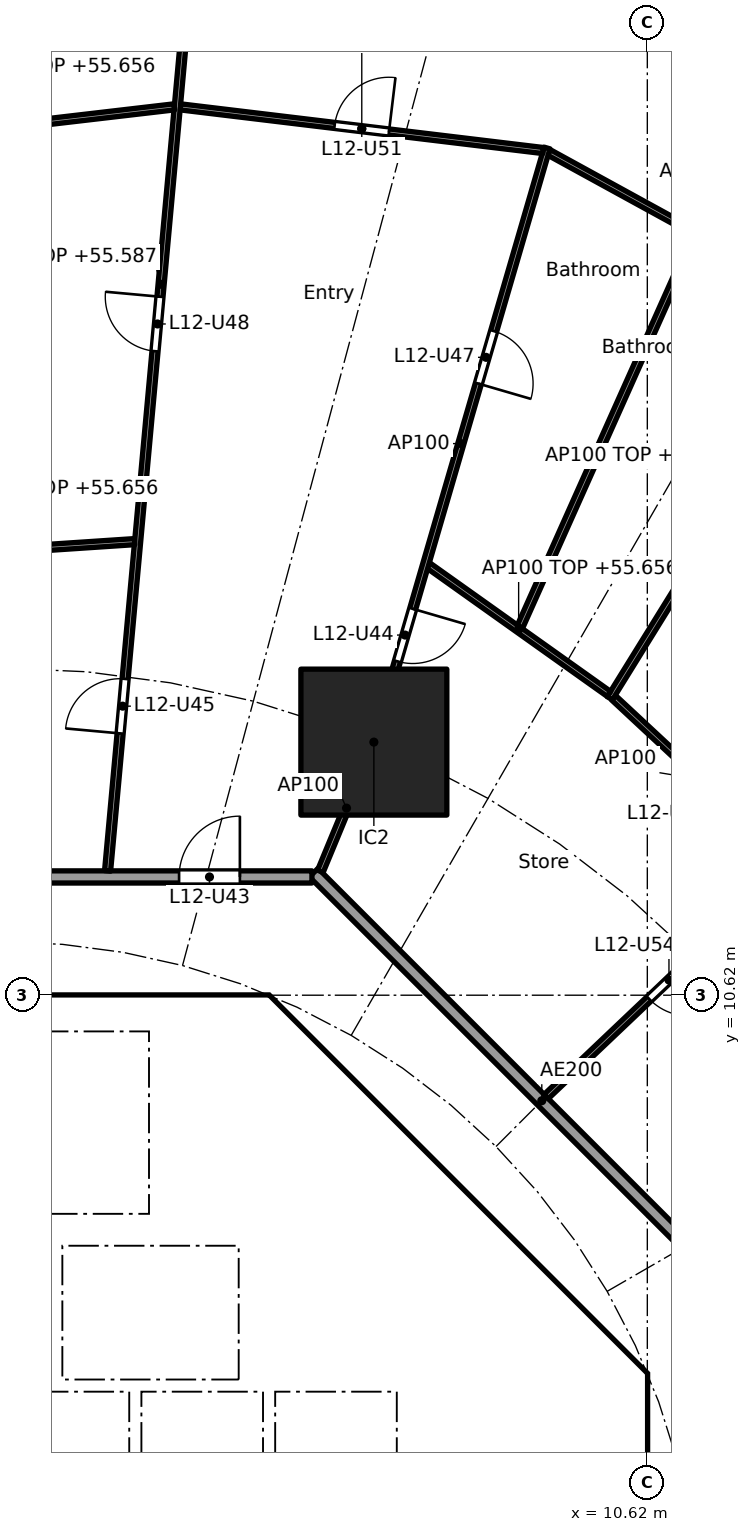
"""IFC4 building model, lengths in metres.
Left out: names, types, materials, properties, quantities, classifications, styles, units other than length and angle.
Written with IfcOpenShell. Run it as: python <this file> out.ifc"""

import sys

from ifc_helpers import new_model, si_unit, direction, frame, frame_2d, origin, origin_2d, place, context, subcontext, project, spatial, polyline, rectangle, outline, extrude, element, fill, save


model = new_model("IFC4")
c1 = context("Model", 3, precision=1e-05, world=origin(), true_north=direction((0.0, 1.0)))
c2 = subcontext(c1, "Body", "Model", "MODEL_VIEW")
j1 = project(units=[si_unit("LENGTHUNIT", "METRE"), si_unit("PLANEANGLEUNIT", "RADIAN")], contexts=[c1])
p1 = place(None, origin())
s1 = spatial("IfcSite", under=j1, at=p1, CompositionType="ELEMENT")
p2 = place(p1, origin())
s2 = spatial("IfcBuilding", under=s1, at=p2, CompositionType="ELEMENT")
p3 = place(p2, frame((0.0, 0.0, 52.9)))
s3 = spatial("IfcBuildingStorey", under=s2, at=p3, CompositionType="ELEMENT", Elevation=52.9)
p4 = place(p3, frame((6.123, 14.782, 0.0), z_axis=(0.0, 0.0, 1.0), x_axis=(1.0, 0.0, 0.0)))
e1 = element("IfcColumn", 1, at=p4, inside=s3, PredefinedType="COLUMN", context=c2, shape_type="SweptSolid", body=[
    extrude(rectangle(XDim=2.4, YDim=2.4, at=origin_2d()), origin(), (0.0, 0.0, 1.0), 3.7),
])
p5 = place(p3, frame((9.988, 4.613, 0.0), z_axis=(0.0, 0.0, 1.0), x_axis=(-0.707106781187, 0.707106781187, 0.0)))
e2 = element("IfcWall", 2, at=p5, inside=s3, PredefinedType="SHEAR", context=c2, shape_type="SweptSolid", body=[
    extrude(rectangle(XDim=7.602, YDim=0.6, at=frame_2d((3.801, 0.0))), origin(), (0.0, 0.0, 1.0), 3.44),
])
p6 = place(p5, frame((3.201, 0.0, 0.0)))
e3 = element("IfcOpeningElement", 3, at=p6, cuts=e2, PredefinedType="OPENING", context=c2, shape_type="SweptSolid", body=[
    extrude(rectangle(XDim=1.2, YDim=2.1, at=frame_2d((0.6, 1.05))), frame((0.0, 0.31, 0.0), z_axis=(0.0, -1.0, 0.0), x_axis=(1.0, 0.0, 0.0)), (0.0, 0.0, 1.0), 0.62),
])
p7 = place(p3, frame((4.0, 4.3, 0.0), z_axis=(0.0, 0.0, 1.0), x_axis=(0.0, 1.0, 0.0)))
e4 = element("IfcWall", 4, at=p7, inside=s3, PredefinedType="SOLIDWALL", context=c2, shape_type="SweptSolid", body=[
    extrude(rectangle(XDim=2.2, YDim=0.2, at=frame_2d((1.1, 0.0))), origin(), (0.0, 0.0, 1.0), 3.44),
])
p8 = place(p7, frame((0.55, 0.0, 0.0)))
e5 = element("IfcOpeningElement", 5, at=p8, cuts=e4, PredefinedType="OPENING", context=c2, shape_type="SweptSolid", body=[
    extrude(rectangle(XDim=1.1, YDim=2.1, at=frame_2d((0.55, 1.05))), frame((0.0, 0.11, 0.0), z_axis=(0.0, -1.0, 0.0), x_axis=(1.0, 0.0, 0.0)), (0.0, 0.0, 1.0), 0.22),
])
p9 = place(p3, frame((6.7, 4.0, 0.0), z_axis=(0.0, 0.0, 1.0), x_axis=(1.0, 0.0, 0.0)))
e6 = element("IfcWall", 6, at=p9, inside=s3, PredefinedType="SOLIDWALL", context=c2, shape_type="SweptSolid", body=[
    extrude(rectangle(XDim=3.325, YDim=0.2, at=frame_2d((1.662, 0.0))), origin(), (0.0, 0.0, 1.0), 3.44),
])
p10 = place(p9, frame((1.25, 0.0, 0.0)))
e7 = element("IfcOpeningElement", 7, at=p10, cuts=e6, PredefinedType="OPENING", context=c2, shape_type="SweptSolid", body=[
    extrude(rectangle(XDim=1.1, YDim=2.1, at=frame_2d((0.55, 1.05))), frame((0.0, 0.11, 0.0), z_axis=(0.0, -1.0, 0.0), x_axis=(1.0, 0.0, 0.0)), (0.0, 0.0, 1.0), 0.22),
])
p11 = place(p3, frame((4.0, 7.025, 0.0), z_axis=(0.0, 0.0, 1.0), x_axis=(0.0, 1.0, 0.0)))
e8 = element("IfcWall", 8, at=p11, inside=s3, PredefinedType="SOLIDWALL", context=c2, shape_type="SweptSolid", body=[
    extrude(rectangle(XDim=3.0, YDim=0.2, at=frame_2d((1.5, 0.0))), origin(), (0.0, 0.0, 1.0), 3.44),
])
p12 = place(p11, frame((0.925, 0.0, 0.0)))
e9 = element("IfcOpeningElement", 9, at=p12, cuts=e8, PredefinedType="OPENING", context=c2, shape_type="SweptSolid", body=[
    extrude(rectangle(XDim=1.1, YDim=2.1, at=frame_2d((0.55, 1.05))), frame((0.0, 0.11, 0.0), z_axis=(0.0, -1.0, 0.0), x_axis=(1.0, 0.0, 0.0)), (0.0, 0.0, 1.0), 0.22),
])
p13 = place(p3, origin())
e10 = element("IfcWall", 10, at=p13, inside=s3, PredefinedType="SHEAR", context=c2, shape_type="SweptSolid", body=[
    extrude(outline(polyline([(-4.152, 10.025), (-4.401, 9.776), (-4.825, 10.2), (-4.401, 10.625), (4.401, 10.625), (4.825, 10.2), (4.401, 9.776), (4.152, 10.025), (-4.152, 10.025)])), origin(), (0.0, 0.0, 1.0), 3.44),
])
p14 = place(p3, origin())
e11 = element("IfcWall", 11, at=p14, inside=s3, PredefinedType="SHEAR", context=c2, shape_type="SweptSolid", body=[
    extrude(outline(polyline([(9.776, -4.401), (10.025, -4.152), (10.025, -3.801), (10.025, 4.152), (9.776, 4.401), (10.2, 4.825), (10.625, 4.401), (10.625, -4.401), (10.2, -4.825), (9.776, -4.401)])), origin(), (0.0, 0.0, 1.0), 3.44),
])
p15 = place(p3, frame((0.9, 4.3, 0.0), z_axis=(0.0, 0.0, 1.0), x_axis=(0.0, 1.0, 0.0)))
e12 = element("IfcWall", 12, at=p15, inside=s3, PredefinedType="SOLIDWALL", context=c2, shape_type="SweptSolid", body=[
    extrude(rectangle(XDim=2.2, YDim=0.2, at=frame_2d((1.1, 0.0))), origin(), (0.0, 0.0, 1.0), 3.44),
])
p16 = place(p3, origin())
e13 = element("IfcWall", 13, at=p16, inside=s3, PredefinedType="SOLIDWALL", context=c2, shape_type="SweptSolid", body=[
    extrude(outline(polyline([(-6.5, 2.1), (-6.7, 2.1), (-6.7, 4.3), (6.7, 4.3), (6.7, 2.1), (6.5, 2.1), (6.5, 4.1), (4.5, 4.1), (4.5, 2.1), (4.3, 2.1), (4.3, 4.1), (2.3, 4.1), (2.3, 2.1), (2.1, 2.1), (2.1, 4.1), (0.1, 4.1), (0.1, 2.1), (-0.1, 2.1), (-0.1, 4.1), (-2.1, 4.1), (-2.1, 2.1), (-2.3, 2.1), (-2.3, 4.1), (-4.3, 4.1), (-4.3, 2.1), (-4.5, 2.1), (-4.5, 4.1), (-6.5, 4.1), (-6.5, 2.1)])), origin(), (0.0, 0.0, 1.0), 3.44),
])
p17 = place(p3, origin())
e14 = element("IfcWall", 14, at=p17, inside=s3, PredefinedType="SOLIDWALL", context=c2, shape_type="SweptSolid", body=[
    extrude(outline(polyline([(4.1, 6.5), (-4.1, 6.5), (-4.1, 7.025), (4.1, 7.025), (4.1, 6.5)])), origin(), (0.0, 0.0, 1.0), 3.44),
])
p18 = place(p3, origin())
e15 = element("IfcWall", 15, at=p18, inside=s3, PredefinedType="SOLIDWALL", context=c2, shape_type="SweptSolid", body=[
    extrude(outline(polyline([(7.025, -3.9), (6.7, -3.9), (6.7, 3.9), (7.025, 3.9), (7.025, -3.9)])), origin(), (0.0, 0.0, 1.0), 3.44),
])
p19 = place(p3, frame((12.635, 5.134, 0.0), z_axis=(0.0, 0.0, 1.0), x_axis=(-0.707106781187, 0.707106781187, 0.0)))
e16 = element("IfcWall", 16, at=p19, inside=s3, PredefinedType="PARTITIONING", context=c2, shape_type="SweptSolid", body=[
    extrude(rectangle(XDim=10.609, YDim=0.2, at=frame_2d((5.305, 0.0))), origin(), (0.0, 0.0, 1.0), 3.44),
])
p20 = place(p3, frame((5.104, 12.565, 0.0), z_axis=(0.0, 0.0, 1.0), x_axis=(-1.0, 0.0, 0.0)))
e17 = element("IfcWall", 17, at=p20, inside=s3, PredefinedType="PARTITIONING", context=c2, shape_type="SweptSolid", body=[
    extrude(rectangle(XDim=10.409, YDim=0.2, at=frame_2d((5.205, 0.0))), origin(), (0.0, 0.0, 1.0), 3.44),
])
p21 = place(p20, frame((1.185, 0.0, 0.0)))
e18 = element("IfcOpeningElement", 18, at=p21, cuts=e17, PredefinedType="OPENING", context=c2, shape_type="SweptSolid", body=[
    extrude(rectangle(XDim=1.0, YDim=2.1, at=frame_2d((0.5, 1.05))), frame((0.0, 0.11, 0.0), z_axis=(0.0, -1.0, 0.0), x_axis=(1.0, 0.0, 0.0)), (0.0, 0.0, 1.0), 0.22),
])
p22 = place(p3, frame((8.957, 8.953, 0.0), z_axis=(0.0, 0.0, 1.0), x_axis=(0.725250022034, 0.688485588476, 0.0)))
e19 = element("IfcWall", 19, at=p22, inside=s3, PredefinedType="PARTITIONING", context=c2, shape_type="SweptSolid", body=[
    extrude(rectangle(XDim=12.963, YDim=0.1, at=frame_2d((6.481, 0.0))), origin(), (0.0, 0.0, 1.0), 2.687),
])
p23 = place(p22, frame((2.333, 0.0, 0.0)))
e20 = element("IfcOpeningElement", 20, at=p23, cuts=e19, PredefinedType="OPENING", context=c2, shape_type="SweptSolid", body=[
    extrude(rectangle(XDim=0.9, YDim=2.1, at=frame_2d((0.45, 1.05))), frame((0.0, 0.06, 0.0), z_axis=(0.0, -1.0, 0.0), x_axis=(1.0, 0.0, 0.0)), (0.0, 0.0, 1.0), 0.12),
])
p24 = place(p22, frame((8.79, 0.0, 0.0)))
e21 = element("IfcOpeningElement", 21, at=p24, cuts=e19, PredefinedType="OPENING", context=c2, shape_type="SweptSolid", body=[
    extrude(rectangle(XDim=0.9, YDim=2.1, at=frame_2d((0.45, 1.05))), frame((0.0, 0.06, 0.0), z_axis=(0.0, -1.0, 0.0), x_axis=(1.0, 0.0, 0.0)), (0.0, 0.0, 1.0), 0.12),
])
p25 = place(p3, frame((12.958, 12.82, 0.0), z_axis=(0.0, 0.0, 1.0), x_axis=(-0.732022571638, 0.681280378855, 0.0)))
e22 = element("IfcWall", 22, at=p25, inside=s3, PredefinedType="PARTITIONING", context=c2, shape_type="SweptSolid", body=[
    extrude(rectangle(XDim=3.95, YDim=0.1, at=frame_2d((1.975, 0.0))), origin(), (0.0, 0.0, 1.0), 3.44),
])
p26 = place(p25, frame((1.525, 0.0, 0.0)))
e23 = element("IfcOpeningElement", 23, at=p26, cuts=e22, PredefinedType="OPENING", context=c2, shape_type="SweptSolid", body=[
    extrude(rectangle(XDim=0.9, YDim=2.1, at=frame_2d((0.45, 1.05))), frame((0.0, 0.06, 0.0), z_axis=(0.0, -1.0, 0.0), x_axis=(1.0, 0.0, 0.0)), (0.0, 0.0, 1.0), 0.12),
])
p27 = place(p3, frame((10.003, 15.503, 0.0), z_axis=(0.0, 0.0, 1.0), x_axis=(0.52645953022, 0.850200189979, 0.0)))
e24 = element("IfcWall", 24, at=p27, inside=s3, PredefinedType="PARTITIONING", context=c2, shape_type="SweptSolid", body=[
    extrude(rectangle(XDim=7.45, YDim=0.1, at=frame_2d((3.725, 0.0))), origin(), (0.0, 0.0, 1.0), 2.756),
])
p28 = place(p3, frame((9.989, 15.574, 0.0), z_axis=(0.0, 0.0, 1.0), x_axis=(-0.81494477814, 0.57953861699, 0.0)))
e25 = element("IfcWall", 25, at=p28, inside=s3, PredefinedType="PARTITIONING", context=c2, shape_type="SweptSolid", body=[
    extrude(rectangle(XDim=3.644, YDim=0.1, at=frame_2d((1.822, 0.0))), origin(), (0.0, 0.0, 1.0), 2.756),
])
p29 = place(p3, frame((13.855, 21.818, 0.0), z_axis=(0.0, 0.0, 1.0), x_axis=(-0.876794415294, 0.480865421203, 0.0)))
e26 = element("IfcWall", 26, at=p29, inside=s3, PredefinedType="PARTITIONING", context=c2, shape_type="SweptSolid", body=[
    extrude(rectangle(XDim=5.536, YDim=0.1, at=frame_2d((2.768, 0.0))), origin(), (0.0, 0.0, 1.0), 2.756),
])
p30 = place(p29, frame((0.934, 0.0, 0.0)))
e27 = element("IfcOpeningElement", 27, at=p30, cuts=e26, PredefinedType="OPENING", context=c2, shape_type="SweptSolid", body=[
    extrude(rectangle(XDim=0.9, YDim=2.1, at=frame_2d((0.45, 1.05))), frame((0.0, 0.06, 0.0), z_axis=(0.0, -1.0, 0.0), x_axis=(1.0, 0.0, 0.0)), (0.0, 0.0, 1.0), 0.12),
])
p31 = place(p3, frame((8.524, 16.676, 0.0), z_axis=(0.0, 0.0, 1.0), x_axis=(0.408065177262, 0.912952797852, 0.0)))
e28 = element("IfcWall", 28, at=p31, inside=s3, PredefinedType="PARTITIONING", context=c2, shape_type="SweptSolid", body=[
    extrude(rectangle(XDim=15.089, YDim=0.1, at=frame_2d((7.544, 0.0))), origin(), (0.0, 0.0, 1.0), 2.837),
])
p32 = place(p3, frame((5.243, 12.657, 0.0), z_axis=(0.0, 0.0, 1.0), x_axis=(0.382719158442, 0.923864733477, 0.0)))
e29 = element("IfcWall", 29, at=p32, inside=s3, PredefinedType="PARTITIONING", context=c2, shape_type="SweptSolid", body=[
    extrude(rectangle(XDim=2.25, YDim=0.1, at=frame_2d((1.125, 0.0))), origin(), (0.0, 0.0, 1.0), 3.44),
])
p33 = place(p3, frame((6.137, 14.83, 0.0), z_axis=(0.0, 0.0, 1.0), x_axis=(0.279843546189, 0.960045618529, 0.0)))
e30 = element("IfcWall", 30, at=p33, inside=s3, PredefinedType="PARTITIONING", context=c2, shape_type="SweptSolid", body=[
    extrude(rectangle(XDim=10.127, YDim=0.1, at=frame_2d((5.063, 0.0))), origin(), (0.0, 0.0, 1.0), 3.44),
])
p34 = place(p33, frame((1.334, 0.0, 0.0)))
e31 = element("IfcOpeningElement", 31, at=p34, cuts=e30, PredefinedType="OPENING", context=c2, shape_type="SweptSolid", body=[
    extrude(rectangle(XDim=0.9, YDim=2.1, at=frame_2d((0.45, 1.05))), frame((0.0, 0.06, 0.0), z_axis=(0.0, -1.0, 0.0), x_axis=(1.0, 0.0, 0.0)), (0.0, 0.0, 1.0), 0.12),
])
p35 = place(p33, frame((6.091, 0.0, 0.0)))
e32 = element("IfcOpeningElement", 32, at=p35, cuts=e30, PredefinedType="OPENING", context=c2, shape_type="SweptSolid", body=[
    extrude(rectangle(XDim=0.9, YDim=2.1, at=frame_2d((0.45, 1.05))), frame((0.0, 0.06, 0.0), z_axis=(0.0, -1.0, 0.0), x_axis=(1.0, 0.0, 0.0)), (0.0, 0.0, 1.0), 0.12),
])
p36 = place(p3, frame((8.907, 24.51, 0.0), z_axis=(0.0, 0.0, 1.0), x_axis=(-0.992836798252, 0.119478416615, 0.0)))
e33 = element("IfcWall", 33, at=p36, inside=s3, PredefinedType="PARTITIONING", context=c2, shape_type="SweptSolid", body=[
    extrude(rectangle(XDim=6.01, YDim=0.1, at=frame_2d((3.005, 0.0))), origin(), (0.0, 0.0, 1.0), 2.756),
])
p37 = place(p36, frame((2.555, 0.0, 0.0)))
e34 = element("IfcOpeningElement", 34, at=p37, cuts=e33, PredefinedType="OPENING", context=c2, shape_type="SweptSolid", body=[
    extrude(rectangle(XDim=0.9, YDim=2.1, at=frame_2d((0.45, 1.05))), frame((0.0, 0.06, 0.0), z_axis=(0.0, -1.0, 0.0), x_axis=(1.0, 0.0, 0.0)), (0.0, 0.0, 1.0), 0.12),
])
p38 = place(p3, frame((1.744, 12.664, 0.0), z_axis=(0.0, 0.0, 1.0), x_axis=(0.090893639596, 0.995860605849, 0.0)))
e35 = element("IfcWall", 35, at=p38, inside=s3, PredefinedType="PARTITIONING", context=c2, shape_type="SweptSolid", body=[
    extrude(rectangle(XDim=19.374, YDim=0.1, at=frame_2d((9.687, 0.0))), origin(), (0.0, 0.0, 1.0), 2.687),
])
p39 = place(p38, frame((2.27, 0.0, 0.0)))
e36 = element("IfcOpeningElement", 36, at=p39, cuts=e35, PredefinedType="OPENING", context=c2, shape_type="SweptSolid", body=[
    extrude(rectangle(XDim=0.9, YDim=2.1, at=frame_2d((0.45, 1.05))), frame((0.0, 0.06, 0.0), z_axis=(0.0, -1.0, 0.0), x_axis=(1.0, 0.0, 0.0)), (0.0, 0.0, 1.0), 0.12),
])
p40 = place(p38, frame((8.582, 0.0, 0.0)))
e37 = element("IfcOpeningElement", 37, at=p40, cuts=e35, PredefinedType="OPENING", context=c2, shape_type="SweptSolid", body=[
    extrude(rectangle(XDim=0.9, YDim=2.1, at=frame_2d((0.45, 1.05))), frame((0.0, 0.06, 0.0), z_axis=(0.0, -1.0, 0.0), x_axis=(1.0, 0.0, 0.0)), (0.0, 0.0, 1.0), 0.12),
])
p41 = place(p38, frame((15.548, 0.0, 0.0)))
e38 = element("IfcOpeningElement", 38, at=p41, cuts=e35, PredefinedType="OPENING", context=c2, shape_type="SweptSolid", body=[
    extrude(rectangle(XDim=0.9, YDim=2.1, at=frame_2d((0.45, 1.05))), frame((0.0, 0.06, 0.0), z_axis=(0.0, -1.0, 0.0), x_axis=(1.0, 0.0, 0.0)), (0.0, 0.0, 1.0), 0.12),
])
p42 = place(p3, frame((2.188, 18.079, 0.0), z_axis=(0.0, 0.0, 1.0), x_axis=(-0.997791437766, -0.066424744789, 0.0)))
e39 = element("IfcWall", 39, at=p42, inside=s3, PredefinedType="PARTITIONING", context=c2, shape_type="SweptSolid", body=[
    extrude(rectangle(XDim=4.469, YDim=0.1, at=frame_2d((2.235, 0.0))), origin(), (0.0, 0.0, 1.0), 2.756),
])
p43 = place(p3, frame((2.842, 25.229, 0.0), z_axis=(0.0, 0.0, 1.0), x_axis=(-0.993255612046, -0.115945198862, 0.0)))
e40 = element("IfcWall", 40, at=p43, inside=s3, PredefinedType="PARTITIONING", context=c2, shape_type="SweptSolid", body=[
    extrude(rectangle(XDim=5.913, YDim=0.1, at=frame_2d((2.956, 0.0))), origin(), (0.0, 0.0, 1.0), 2.756),
])
p44 = place(p8, origin())
e41 = element("IfcDoor", 41, at=p44, inside=s3, OperationType="DOUBLE_DOOR_SLIDING", PredefinedType="DOOR", context=c2, shape_type="SweptSolid", body=[
    extrude(rectangle(XDim=1.1, YDim=2.1, at=frame_2d((0.55, 1.05))), frame((0.0, 0.025, 0.0), z_axis=(0.0, -1.0, 0.0), x_axis=(1.0, 0.0, 0.0)), (0.0, 0.0, 1.0), 0.05),
])
fill(e5, e41)
p45 = place(p10, frame((1.1, 0.0, 0.0), x_axis=(-1.0, 0.0, 0.0)))
e42 = element("IfcDoor", 42, at=p45, inside=s3, OperationType="SINGLE_SWING_LEFT", PredefinedType="DOOR", context=c2, shape_type="SweptSolid", body=[
    extrude(rectangle(XDim=1.1, YDim=2.1, at=frame_2d((0.55, 1.05))), frame((0.0, 0.025, 0.0), z_axis=(0.0, -1.0, 0.0), x_axis=(1.0, 0.0, 0.0)), (0.0, 0.0, 1.0), 0.05),
])
fill(e7, e42)
p46 = place(p12, origin())
e43 = element("IfcDoor", 43, at=p46, inside=s3, OperationType="SINGLE_SWING_RIGHT", PredefinedType="DOOR", context=c2, shape_type="SweptSolid", body=[
    extrude(rectangle(XDim=1.1, YDim=2.1, at=frame_2d((0.55, 1.05))), frame((0.0, 0.025, 0.0), z_axis=(0.0, -1.0, 0.0), x_axis=(1.0, 0.0, 0.0)), (0.0, 0.0, 1.0), 0.05),
])
fill(e9, e43)
p47 = place(p6, origin())
e44 = element("IfcDoor", 44, at=p47, inside=s3, OperationType="SINGLE_SWING_LEFT", PredefinedType="DOOR", context=c2, shape_type="SweptSolid", body=[
    extrude(rectangle(XDim=1.2, YDim=2.1, at=frame_2d((0.6, 1.05))), frame((0.0, 0.025, 0.0), z_axis=(0.0, -1.0, 0.0), x_axis=(1.0, 0.0, 0.0)), (0.0, 0.0, 1.0), 0.05),
])
fill(e3, e44)
p48 = place(p21, frame((1.0, 0.0, 0.0), x_axis=(-1.0, 0.0, 0.0)))
e45 = element("IfcDoor", 45, at=p48, inside=s3, OperationType="SINGLE_SWING_RIGHT", PredefinedType="DOOR", context=c2, shape_type="SweptSolid", body=[
    extrude(rectangle(XDim=1.0, YDim=2.1, at=frame_2d((0.5, 1.05))), frame((0.0, 0.025, 0.0), z_axis=(0.0, -1.0, 0.0), x_axis=(1.0, 0.0, 0.0)), (0.0, 0.0, 1.0), 0.05),
])
fill(e18, e45)
p49 = place(p34, frame((0.9, 0.0, 0.0), x_axis=(-1.0, 0.0, 0.0)))
e46 = element("IfcDoor", 46, at=p49, inside=s3, OperationType="SINGLE_SWING_LEFT", PredefinedType="DOOR", context=c2, shape_type="SweptSolid", body=[
    extrude(rectangle(XDim=0.9, YDim=2.1, at=frame_2d((0.45, 1.05))), frame((0.0, 0.025, 0.0), z_axis=(0.0, -1.0, 0.0), x_axis=(1.0, 0.0, 0.0)), (0.0, 0.0, 1.0), 0.05),
])
fill(e31, e46)
p50 = place(p39, origin())
e47 = element("IfcDoor", 47, at=p50, inside=s3, OperationType="SINGLE_SWING_LEFT", PredefinedType="DOOR", context=c2, shape_type="SweptSolid", body=[
    extrude(rectangle(XDim=0.9, YDim=2.1, at=frame_2d((0.45, 1.05))), frame((0.0, 0.025, 0.0), z_axis=(0.0, -1.0, 0.0), x_axis=(1.0, 0.0, 0.0)), (0.0, 0.0, 1.0), 0.05),
])
fill(e36, e47)
p51 = place(p35, frame((0.9, 0.0, 0.0), x_axis=(-1.0, 0.0, 0.0)))
e48 = element("IfcDoor", 48, at=p51, inside=s3, OperationType="SINGLE_SWING_RIGHT", PredefinedType="DOOR", context=c2, shape_type="SweptSolid", body=[
    extrude(rectangle(XDim=0.9, YDim=2.1, at=frame_2d((0.45, 1.05))), frame((0.0, 0.025, 0.0), z_axis=(0.0, -1.0, 0.0), x_axis=(1.0, 0.0, 0.0)), (0.0, 0.0, 1.0), 0.05),
])
fill(e32, e48)
p52 = place(p40, origin())
e49 = element("IfcDoor", 49, at=p52, inside=s3, OperationType="SINGLE_SWING_RIGHT", PredefinedType="DOOR", context=c2, shape_type="SweptSolid", body=[
    extrude(rectangle(XDim=0.9, YDim=2.1, at=frame_2d((0.45, 1.05))), frame((0.0, 0.025, 0.0), z_axis=(0.0, -1.0, 0.0), x_axis=(1.0, 0.0, 0.0)), (0.0, 0.0, 1.0), 0.05),
])
fill(e37, e49)
p53 = place(p37, frame((0.9, 0.0, 0.0), x_axis=(-1.0, 0.0, 0.0)))
e50 = element("IfcDoor", 50, at=p53, inside=s3, OperationType="SINGLE_SWING_RIGHT", PredefinedType="DOOR", context=c2, shape_type="SweptSolid", body=[
    extrude(rectangle(XDim=0.9, YDim=2.1, at=frame_2d((0.45, 1.05))), frame((0.0, 0.025, 0.0), z_axis=(0.0, -1.0, 0.0), x_axis=(1.0, 0.0, 0.0)), (0.0, 0.0, 1.0), 0.05),
])
fill(e34, e50)
p54 = place(p23, frame((0.9, 0.0, 0.0), x_axis=(-1.0, 0.0, 0.0)))
e51 = element("IfcDoor", 51, at=p54, inside=s3, OperationType="SINGLE_SWING_LEFT", PredefinedType="DOOR", context=c2, shape_type="SweptSolid", body=[
    extrude(rectangle(XDim=0.9, YDim=2.1, at=frame_2d((0.45, 1.05))), frame((0.0, 0.025, 0.0), z_axis=(0.0, -1.0, 0.0), x_axis=(1.0, 0.0, 0.0)), (0.0, 0.0, 1.0), 0.05),
])
fill(e20, e51)
save(model, sys.argv[1])
